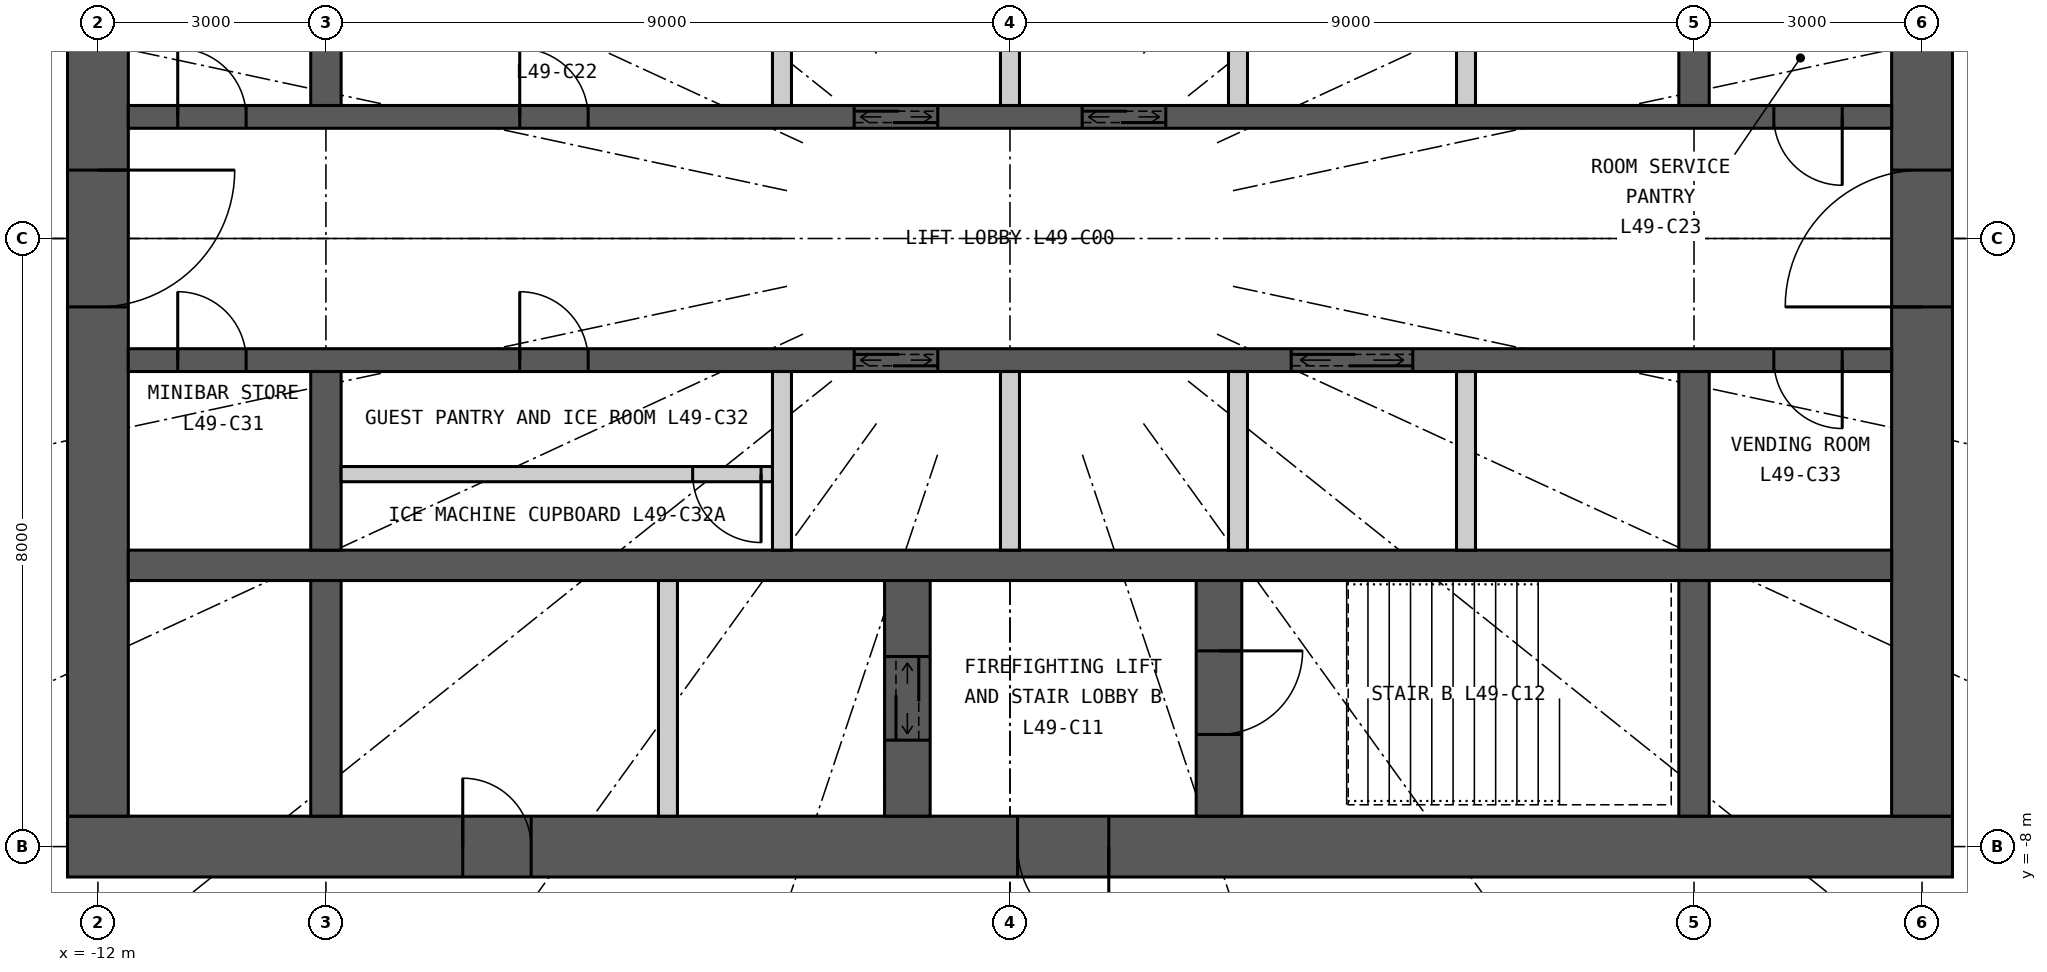
"""IFC4 building model, lengths in metres.
Left out: names, types, materials, properties, quantities, classifications, styles, units other than length and angle.
Written with IfcOpenShell. Run it as: python <this file> out.ifc"""

import sys

from ifc_helpers import new_model, si_unit, direction, frame, frame_2d, origin, place, context, subcontext, project, spatial, rectangle, extrude, element, fill, save


model = new_model("IFC4")
c1 = context("Model", 3, precision=1e-05, world=origin(), true_north=direction((0.0, 1.0)))
c2 = subcontext(c1, "Body", "Model", "MODEL_VIEW")
j1 = project(units=[si_unit("LENGTHUNIT", "METRE"), si_unit("PLANEANGLEUNIT", "RADIAN")], contexts=[c1])
p1 = place(None, origin())
s1 = spatial("IfcSite", under=j1, at=p1, CompositionType="ELEMENT")
p2 = place(p1, origin())
s2 = spatial("IfcBuilding", under=s1, at=p2, CompositionType="ELEMENT")
p3 = place(p2, frame((0.0, 0.0, 183.0)))
s3 = spatial("IfcBuildingStorey", under=s2, at=p3, CompositionType="ELEMENT", Elevation=183.0)
p4 = place(p3, frame((12.4, -8.0, 0.0), z_axis=(0.0, 0.0, 1.0), x_axis=(-1.0, 0.0, 0.0)))
e1 = element("IfcWall", 1, at=p4, inside=s3, PredefinedType="SHEAR", context=c2, shape_type="SweptSolid", body=[
    extrude(rectangle(XDim=24.8, YDim=0.8, at=frame_2d((12.4, 0.0))), origin(), (0.0, 0.0, 1.0), 3.3),
])
p5 = place(p4, frame((11.1, 0.0, 0.0)))
e2 = element("IfcOpeningElement", 2, at=p5, cuts=e1, PredefinedType="OPENING", context=c2, shape_type="SweptSolid", body=[
    extrude(rectangle(XDim=1.2, YDim=2.2, at=frame_2d((0.6, 1.1))), frame((0.0, 0.41, 0.0), z_axis=(0.0, -1.0, 0.0), x_axis=(1.0, 0.0, 0.0)), (0.0, 0.0, 1.0), 0.82),
])
p6 = place(p4, frame((18.7, 0.0, 0.0)))
e3 = element("IfcOpeningElement", 3, at=p6, cuts=e1, PredefinedType="OPENING", context=c2, shape_type="SweptSolid", body=[
    extrude(rectangle(XDim=0.9, YDim=2.2, at=frame_2d((0.45, 1.1))), frame((0.0, 0.41, 0.0), z_axis=(0.0, -1.0, 0.0), x_axis=(1.0, 0.0, 0.0)), (0.0, 0.0, 1.0), 0.82),
])
p7 = place(p3, frame((12.0, -7.6, 0.0), z_axis=(0.0, 0.0, 1.0), x_axis=(0.0, 1.0, 0.0)))
e4 = element("IfcWall", 4, at=p7, inside=s3, PredefinedType="SHEAR", context=c2, shape_type="SweptSolid", body=[
    extrude(rectangle(XDim=15.2, YDim=0.8, at=frame_2d((7.6, 0.0))), origin(), (0.0, 0.0, 1.0), 3.3),
])
p8 = place(p7, frame((6.7, 0.0, 0.0)))
e5 = element("IfcOpeningElement", 5, at=p8, cuts=e4, PredefinedType="OPENING", context=c2, shape_type="SweptSolid", body=[
    extrude(rectangle(XDim=1.8, YDim=2.2, at=frame_2d((0.9, 1.1))), frame((0.0, 0.41, 0.0), z_axis=(0.0, -1.0, 0.0), x_axis=(1.0, 0.0, 0.0)), (0.0, 0.0, 1.0), 0.82),
])
p9 = place(p3, frame((-12.0, 7.6, 0.0), z_axis=(0.0, 0.0, 1.0), x_axis=(0.0, -1.0, 0.0)))
e6 = element("IfcWall", 6, at=p9, inside=s3, PredefinedType="SHEAR", context=c2, shape_type="SweptSolid", body=[
    extrude(rectangle(XDim=15.2, YDim=0.8, at=frame_2d((7.6, 0.0))), origin(), (0.0, 0.0, 1.0), 3.3),
])
p10 = place(p9, frame((6.7, 0.0, 0.0)))
e7 = element("IfcOpeningElement", 7, at=p10, cuts=e6, PredefinedType="OPENING", context=c2, shape_type="SweptSolid", body=[
    extrude(rectangle(XDim=1.8, YDim=2.2, at=frame_2d((0.9, 1.1))), frame((0.0, 0.41, 0.0), z_axis=(0.0, -1.0, 0.0), x_axis=(1.0, 0.0, 0.0)), (0.0, 0.0, 1.0), 0.82),
])
p11 = place(p3, frame((-11.6, 1.6, 0.0), z_axis=(0.0, 0.0, 1.0), x_axis=(1.0, 0.0, 0.0)))
e8 = element("IfcWall", 8, at=p11, inside=s3, PredefinedType="SHEAR", context=c2, shape_type="SweptSolid", body=[
    extrude(rectangle(XDim=23.2, YDim=0.3, at=frame_2d((11.6, 0.0))), origin(), (0.0, 0.0, 1.0), 3.3),
])
p12 = place(p11, frame((9.55, 0.0, 0.0)))
e9 = element("IfcOpeningElement", 9, at=p12, cuts=e8, PredefinedType="OPENING", context=c2, shape_type="SweptSolid", body=[
    extrude(rectangle(XDim=1.1, YDim=2.2, at=frame_2d((0.55, 1.1))), frame((0.0, 0.16, 0.0), z_axis=(0.0, -1.0, 0.0), x_axis=(1.0, 0.0, 0.0)), (0.0, 0.0, 1.0), 0.32),
])
p13 = place(p11, frame((12.55, 0.0, 0.0)))
e10 = element("IfcOpeningElement", 10, at=p13, cuts=e8, PredefinedType="OPENING", context=c2, shape_type="SweptSolid", body=[
    extrude(rectangle(XDim=1.1, YDim=2.2, at=frame_2d((0.55, 1.1))), frame((0.0, 0.16, 0.0), z_axis=(0.0, -1.0, 0.0), x_axis=(1.0, 0.0, 0.0)), (0.0, 0.0, 1.0), 0.32),
])
p14 = place(p11, frame((0.65, 0.0, 0.0)))
e11 = element("IfcOpeningElement", 11, at=p14, cuts=e8, PredefinedType="OPENING", context=c2, shape_type="SweptSolid", body=[
    extrude(rectangle(XDim=0.9, YDim=2.2, at=frame_2d((0.45, 1.1))), frame((0.0, 0.16, 0.0), z_axis=(0.0, -1.0, 0.0), x_axis=(1.0, 0.0, 0.0)), (0.0, 0.0, 1.0), 0.32),
])
p15 = place(p11, frame((5.15, 0.0, 0.0)))
e12 = element("IfcOpeningElement", 12, at=p15, cuts=e8, PredefinedType="OPENING", context=c2, shape_type="SweptSolid", body=[
    extrude(rectangle(XDim=0.9, YDim=2.2, at=frame_2d((0.45, 1.1))), frame((0.0, 0.16, 0.0), z_axis=(0.0, -1.0, 0.0), x_axis=(1.0, 0.0, 0.0)), (0.0, 0.0, 1.0), 0.32),
])
p16 = place(p11, frame((21.65, 0.0, 0.0)))
e13 = element("IfcOpeningElement", 13, at=p16, cuts=e8, PredefinedType="OPENING", context=c2, shape_type="SweptSolid", body=[
    extrude(rectangle(XDim=0.9, YDim=2.2, at=frame_2d((0.45, 1.1))), frame((0.0, 0.16, 0.0), z_axis=(0.0, -1.0, 0.0), x_axis=(1.0, 0.0, 0.0)), (0.0, 0.0, 1.0), 0.32),
])
p17 = place(p3, frame((-11.6, -4.3, 0.0), z_axis=(0.0, 0.0, 1.0), x_axis=(1.0, 0.0, 0.0)))
e14 = element("IfcWall", 14, at=p17, inside=s3, PredefinedType="SHEAR", context=c2, shape_type="SweptSolid", body=[
    extrude(rectangle(XDim=23.2, YDim=0.4, at=frame_2d((11.6, 0.0))), origin(), (0.0, 0.0, 1.0), 3.3),
])
p18 = place(p3, frame((-11.6, -1.6, 0.0), z_axis=(0.0, 0.0, 1.0), x_axis=(1.0, 0.0, 0.0)))
e15 = element("IfcWall", 15, at=p18, inside=s3, PredefinedType="SHEAR", context=c2, shape_type="SweptSolid", body=[
    extrude(rectangle(XDim=23.2, YDim=0.3, at=frame_2d((11.6, 0.0))), origin(), (0.0, 0.0, 1.0), 3.3),
])
p19 = place(p18, frame((9.55, 0.0, 0.0)))
e16 = element("IfcOpeningElement", 16, at=p19, cuts=e15, PredefinedType="OPENING", context=c2, shape_type="SweptSolid", body=[
    extrude(rectangle(XDim=1.1, YDim=2.2, at=frame_2d((0.55, 1.1))), frame((0.0, 0.16, 0.0), z_axis=(0.0, -1.0, 0.0), x_axis=(1.0, 0.0, 0.0)), (0.0, 0.0, 1.0), 0.32),
])
p20 = place(p18, frame((15.3, 0.0, 0.0)))
e17 = element("IfcOpeningElement", 17, at=p20, cuts=e15, PredefinedType="OPENING", context=c2, shape_type="SweptSolid", body=[
    extrude(rectangle(XDim=1.6, YDim=2.4, at=frame_2d((0.8, 1.2))), frame((0.0, 0.16, 0.0), z_axis=(0.0, -1.0, 0.0), x_axis=(1.0, 0.0, 0.0)), (0.0, 0.0, 1.0), 0.32),
])
p21 = place(p18, frame((0.65, 0.0, 0.0)))
e18 = element("IfcOpeningElement", 18, at=p21, cuts=e15, PredefinedType="OPENING", context=c2, shape_type="SweptSolid", body=[
    extrude(rectangle(XDim=0.9, YDim=2.2, at=frame_2d((0.45, 1.1))), frame((0.0, 0.16, 0.0), z_axis=(0.0, -1.0, 0.0), x_axis=(1.0, 0.0, 0.0)), (0.0, 0.0, 1.0), 0.32),
])
p22 = place(p18, frame((5.15, 0.0, 0.0)))
e19 = element("IfcOpeningElement", 19, at=p22, cuts=e15, PredefinedType="OPENING", context=c2, shape_type="SweptSolid", body=[
    extrude(rectangle(XDim=0.9, YDim=2.2, at=frame_2d((0.45, 1.1))), frame((0.0, 0.16, 0.0), z_axis=(0.0, -1.0, 0.0), x_axis=(1.0, 0.0, 0.0)), (0.0, 0.0, 1.0), 0.32),
])
p23 = place(p18, frame((21.65, 0.0, 0.0)))
e20 = element("IfcOpeningElement", 20, at=p23, cuts=e15, PredefinedType="OPENING", context=c2, shape_type="SweptSolid", body=[
    extrude(rectangle(XDim=0.9, YDim=2.2, at=frame_2d((0.45, 1.1))), frame((0.0, 0.16, 0.0), z_axis=(0.0, -1.0, 0.0), x_axis=(1.0, 0.0, 0.0)), (0.0, 0.0, 1.0), 0.32),
])
for number, where, z_axis, x_axis in (
    (21, (-9.0, 1.75, 0.0), (0.0, 0.0, 1.0), (0.0, 1.0, 0.0)),
    (22, (-9.0, -4.1, 0.0), (0.0, 0.0, 1.0), (0.0, 1.0, 0.0)),
):
    element("IfcWall", number, at=place(p3, frame(where, z_axis=z_axis, x_axis=x_axis)), inside=s3, PredefinedType="SHEAR", context=c2, shape_type="SweptSolid", body=[
        extrude(rectangle(XDim=2.35, YDim=0.4, at=frame_2d((1.175, 0.0))), origin(), (0.0, 0.0, 1.0), 3.3),
    ])
p24 = place(p3, frame((-9.0, -7.6, 0.0), z_axis=(0.0, 0.0, 1.0), x_axis=(0.0, 1.0, 0.0)))
e23 = element("IfcWall", 23, at=p24, inside=s3, PredefinedType="SHEAR", context=c2, shape_type="SweptSolid", body=[
    extrude(rectangle(XDim=3.1, YDim=0.4, at=frame_2d((1.55, 0.0))), origin(), (0.0, 0.0, 1.0), 3.3),
])
for number, where, z_axis, x_axis in (
    (24, (9.0, 1.75, 0.0), (0.0, 0.0, 1.0), (0.0, 1.0, 0.0)),
    (25, (9.0, -4.1, 0.0), (0.0, 0.0, 1.0), (0.0, 1.0, 0.0)),
):
    element("IfcWall", number, at=place(p3, frame(where, z_axis=z_axis, x_axis=x_axis)), inside=s3, PredefinedType="SHEAR", context=c2, shape_type="SweptSolid", body=[
        extrude(rectangle(XDim=2.35, YDim=0.4, at=frame_2d((1.175, 0.0))), origin(), (0.0, 0.0, 1.0), 3.3),
    ])
p25 = place(p3, frame((9.0, -7.6, 0.0), z_axis=(0.0, 0.0, 1.0), x_axis=(0.0, 1.0, 0.0)))
e26 = element("IfcWall", 26, at=p25, inside=s3, PredefinedType="SHEAR", context=c2, shape_type="SweptSolid", body=[
    extrude(rectangle(XDim=3.1, YDim=0.4, at=frame_2d((1.55, 0.0))), origin(), (0.0, 0.0, 1.0), 3.3),
])
p26 = place(p3, frame((2.75, -7.6, 0.0), z_axis=(0.0, 0.0, 1.0), x_axis=(0.0, 1.0, 0.0)))
e27 = element("IfcWall", 27, at=p26, inside=s3, PredefinedType="SHEAR", context=c2, shape_type="SweptSolid", body=[
    extrude(rectangle(XDim=3.1, YDim=0.6, at=frame_2d((1.55, 0.0))), origin(), (0.0, 0.0, 1.0), 3.3),
])
p27 = place(p26, frame((1.075, 0.0, 0.0)))
e28 = element("IfcOpeningElement", 28, at=p27, cuts=e27, PredefinedType="OPENING", context=c2, shape_type="SweptSolid", body=[
    extrude(rectangle(XDim=1.1, YDim=2.2, at=frame_2d((0.55, 1.1))), frame((0.0, 0.31, 0.0), z_axis=(0.0, -1.0, 0.0), x_axis=(1.0, 0.0, 0.0)), (0.0, 0.0, 1.0), 0.62),
])
p28 = place(p3, frame((-1.35, -7.6, 0.0), z_axis=(0.0, 0.0, 1.0), x_axis=(0.0, 1.0, 0.0)))
e29 = element("IfcWall", 29, at=p28, inside=s3, PredefinedType="SHEAR", context=c2, shape_type="SweptSolid", body=[
    extrude(rectangle(XDim=3.1, YDim=0.6, at=frame_2d((1.55, 0.0))), origin(), (0.0, 0.0, 1.0), 3.3),
])
p29 = place(p28, frame((1.0, 0.0, 0.0)))
e30 = element("IfcOpeningElement", 30, at=p29, cuts=e29, PredefinedType="OPENING", context=c2, shape_type="SweptSolid", body=[
    extrude(rectangle(XDim=1.1, YDim=2.2, at=frame_2d((0.55, 1.1))), frame((0.0, 0.31, 0.0), z_axis=(0.0, -1.0, 0.0), x_axis=(1.0, 0.0, 0.0)), (0.0, 0.0, 1.0), 0.62),
])
p30 = place(p3, frame((-4.5, -7.6, 0.0), z_axis=(0.0, 0.0, 1.0), x_axis=(0.0, 1.0, 0.0)))
e31 = element("IfcWall", 31, at=p30, inside=s3, PredefinedType="PARTITIONING", context=c2, shape_type="SweptSolid", body=[
    extrude(rectangle(XDim=3.1, YDim=0.25, at=frame_2d((1.55, 0.0))), origin(), (0.0, 0.0, 1.0), 3.3),
])
for number, where, z_axis, x_axis in (
    (32, (-3.0, 1.75, 0.0), (0.0, 0.0, 1.0), (0.0, 1.0, 0.0)),
    (33, (0.0, 1.75, 0.0), (0.0, 0.0, 1.0), (0.0, 1.0, 0.0)),
    (34, (3.0, 1.75, 0.0), (0.0, 0.0, 1.0), (0.0, 1.0, 0.0)),
    (35, (6.0, 1.75, 0.0), (0.0, 0.0, 1.0), (0.0, 1.0, 0.0)),
    (36, (-3.0, -4.1, 0.0), (0.0, 0.0, 1.0), (0.0, 1.0, 0.0)),
    (37, (0.0, -4.1, 0.0), (0.0, 0.0, 1.0), (0.0, 1.0, 0.0)),
    (38, (3.0, -4.1, 0.0), (0.0, 0.0, 1.0), (0.0, 1.0, 0.0)),
    (39, (6.0, -4.1, 0.0), (0.0, 0.0, 1.0), (0.0, 1.0, 0.0)),
):
    element("IfcWall", number, at=place(p3, frame(where, z_axis=z_axis, x_axis=x_axis)), inside=s3, PredefinedType="PARTITIONING", context=c2, shape_type="SweptSolid", body=[
        extrude(rectangle(XDim=2.35, YDim=0.25, at=frame_2d((1.175, 0.0))), origin(), (0.0, 0.0, 1.0), 3.3),
    ])
p31 = place(p3, frame((-8.8, -3.1, 0.0), z_axis=(0.0, 0.0, 1.0), x_axis=(1.0, 0.0, 0.0)))
e40 = element("IfcWall", 40, at=p31, inside=s3, PredefinedType="PARTITIONING", context=c2, shape_type="SweptSolid", body=[
    extrude(rectangle(XDim=5.675, YDim=0.2, at=frame_2d((2.837, 0.0))), origin(), (0.0, 0.0, 1.0), 3.05),
])
p32 = place(p31, frame((4.625, 0.0, 0.0)))
e41 = element("IfcOpeningElement", 41, at=p32, cuts=e40, PredefinedType="OPENING", context=c2, shape_type="SweptSolid", body=[
    extrude(rectangle(XDim=0.9, YDim=2.2, at=frame_2d((0.45, 1.1))), frame((0.0, 0.11, 0.0), z_axis=(0.0, -1.0, 0.0), x_axis=(1.0, 0.0, 0.0)), (0.0, 0.0, 1.0), 0.22),
])
p33 = place(p5, origin())
e42 = element("IfcDoor", 42, at=p33, inside=s3, OperationType="SINGLE_SWING_LEFT", PredefinedType="DOOR", context=c2, shape_type="SweptSolid", body=[
    extrude(rectangle(XDim=1.2, YDim=2.2, at=frame_2d((0.6, 1.1))), frame((0.0, 0.025, 0.0), z_axis=(0.0, -1.0, 0.0), x_axis=(1.0, 0.0, 0.0)), (0.0, 0.0, 1.0), 0.05),
])
fill(e2, e42)
p34 = place(p27, origin())
e43 = element("IfcDoor", 43, at=p34, inside=s3, OperationType="SINGLE_SWING_RIGHT", PredefinedType="DOOR", context=c2, shape_type="SweptSolid", body=[
    extrude(rectangle(XDim=1.1, YDim=2.2, at=frame_2d((0.55, 1.1))), frame((0.0, 0.025, 0.0), z_axis=(0.0, -1.0, 0.0), x_axis=(1.0, 0.0, 0.0)), (0.0, 0.0, 1.0), 0.05),
])
fill(e28, e43)
p35 = place(p29, origin())
e44 = element("IfcDoor", 44, at=p35, inside=s3, OperationType="DOUBLE_DOOR_SLIDING", PredefinedType="DOOR", context=c2, shape_type="SweptSolid", body=[
    extrude(rectangle(XDim=1.1, YDim=2.2, at=frame_2d((0.55, 1.1))), frame((0.0, 0.025, 0.0), z_axis=(0.0, -1.0, 0.0), x_axis=(1.0, 0.0, 0.0)), (0.0, 0.0, 1.0), 0.05),
])
fill(e30, e44)
p36 = place(p6, origin())
e45 = element("IfcDoor", 45, at=p36, inside=s3, OperationType="SINGLE_SWING_RIGHT", PredefinedType="DOOR", context=c2, shape_type="SweptSolid", body=[
    extrude(rectangle(XDim=0.9, YDim=2.2, at=frame_2d((0.45, 1.1))), frame((0.0, 0.025, 0.0), z_axis=(0.0, -1.0, 0.0), x_axis=(1.0, 0.0, 0.0)), (0.0, 0.0, 1.0), 0.05),
])
fill(e3, e45)
p37 = place(p12, origin())
e46 = element("IfcDoor", 46, at=p37, inside=s3, OperationType="DOUBLE_DOOR_SLIDING", PredefinedType="DOOR", context=c2, shape_type="SweptSolid", body=[
    extrude(rectangle(XDim=1.1, YDim=2.2, at=frame_2d((0.55, 1.1))), frame((0.0, 0.025, 0.0), z_axis=(0.0, -1.0, 0.0), x_axis=(1.0, 0.0, 0.0)), (0.0, 0.0, 1.0), 0.05),
])
fill(e9, e46)
p38 = place(p13, origin())
e47 = element("IfcDoor", 47, at=p38, inside=s3, OperationType="DOUBLE_DOOR_SLIDING", PredefinedType="DOOR", context=c2, shape_type="SweptSolid", body=[
    extrude(rectangle(XDim=1.1, YDim=2.2, at=frame_2d((0.55, 1.1))), frame((0.0, 0.025, 0.0), z_axis=(0.0, -1.0, 0.0), x_axis=(1.0, 0.0, 0.0)), (0.0, 0.0, 1.0), 0.05),
])
fill(e10, e47)
p39 = place(p19, origin())
e48 = element("IfcDoor", 48, at=p39, inside=s3, OperationType="DOUBLE_DOOR_SLIDING", PredefinedType="DOOR", context=c2, shape_type="SweptSolid", body=[
    extrude(rectangle(XDim=1.1, YDim=2.2, at=frame_2d((0.55, 1.1))), frame((0.0, 0.025, 0.0), z_axis=(0.0, -1.0, 0.0), x_axis=(1.0, 0.0, 0.0)), (0.0, 0.0, 1.0), 0.05),
])
fill(e16, e48)
p40 = place(p20, origin())
e49 = element("IfcDoor", 49, at=p40, inside=s3, OperationType="DOUBLE_DOOR_SLIDING", PredefinedType="DOOR", context=c2, shape_type="SweptSolid", body=[
    extrude(rectangle(XDim=1.6, YDim=2.4, at=frame_2d((0.8, 1.2))), frame((0.0, 0.025, 0.0), z_axis=(0.0, -1.0, 0.0), x_axis=(1.0, 0.0, 0.0)), (0.0, 0.0, 1.0), 0.05),
])
fill(e17, e49)
p41 = place(p14, origin())
e50 = element("IfcDoor", 50, at=p41, inside=s3, OperationType="SINGLE_SWING_LEFT", PredefinedType="DOOR", context=c2, shape_type="SweptSolid", body=[
    extrude(rectangle(XDim=0.9, YDim=2.2, at=frame_2d((0.45, 1.1))), frame((0.0, 0.025, 0.0), z_axis=(0.0, -1.0, 0.0), x_axis=(1.0, 0.0, 0.0)), (0.0, 0.0, 1.0), 0.05),
])
fill(e11, e50)
p42 = place(p15, origin())
e51 = element("IfcDoor", 51, at=p42, inside=s3, OperationType="SINGLE_SWING_LEFT", PredefinedType="DOOR", context=c2, shape_type="SweptSolid", body=[
    extrude(rectangle(XDim=0.9, YDim=2.2, at=frame_2d((0.45, 1.1))), frame((0.0, 0.025, 0.0), z_axis=(0.0, -1.0, 0.0), x_axis=(1.0, 0.0, 0.0)), (0.0, 0.0, 1.0), 0.05),
])
fill(e12, e51)
p43 = place(p21, origin())
e52 = element("IfcDoor", 52, at=p43, inside=s3, OperationType="SINGLE_SWING_LEFT", PredefinedType="DOOR", context=c2, shape_type="SweptSolid", body=[
    extrude(rectangle(XDim=0.9, YDim=2.2, at=frame_2d((0.45, 1.1))), frame((0.0, 0.025, 0.0), z_axis=(0.0, -1.0, 0.0), x_axis=(1.0, 0.0, 0.0)), (0.0, 0.0, 1.0), 0.05),
])
fill(e18, e52)
p44 = place(p32, origin())
e53 = element("IfcDoor", 53, at=p44, inside=s3, OperationType="SINGLE_SWING_RIGHT", PredefinedType="DOOR", context=c2, shape_type="SweptSolid", body=[
    extrude(rectangle(XDim=0.9, YDim=2.2, at=frame_2d((0.45, 1.1))), frame((0.0, 0.025, 0.0), z_axis=(0.0, -1.0, 0.0), x_axis=(1.0, 0.0, 0.0)), (0.0, 0.0, 1.0), 0.05),
])
fill(e41, e53)
p45 = place(p22, origin())
e54 = element("IfcDoor", 54, at=p45, inside=s3, OperationType="SINGLE_SWING_LEFT", PredefinedType="DOOR", context=c2, shape_type="SweptSolid", body=[
    extrude(rectangle(XDim=0.9, YDim=2.2, at=frame_2d((0.45, 1.1))), frame((0.0, 0.025, 0.0), z_axis=(0.0, -1.0, 0.0), x_axis=(1.0, 0.0, 0.0)), (0.0, 0.0, 1.0), 0.05),
])
fill(e19, e54)
p46 = place(p23, origin())
e55 = element("IfcDoor", 55, at=p46, inside=s3, OperationType="SINGLE_SWING_RIGHT", PredefinedType="DOOR", context=c2, shape_type="SweptSolid", body=[
    extrude(rectangle(XDim=0.9, YDim=2.2, at=frame_2d((0.45, 1.1))), frame((0.0, 0.025, 0.0), z_axis=(0.0, -1.0, 0.0), x_axis=(1.0, 0.0, 0.0)), (0.0, 0.0, 1.0), 0.05),
])
fill(e20, e55)
p47 = place(p16, origin())
e56 = element("IfcDoor", 56, at=p47, inside=s3, OperationType="SINGLE_SWING_RIGHT", PredefinedType="DOOR", context=c2, shape_type="SweptSolid", body=[
    extrude(rectangle(XDim=0.9, YDim=2.2, at=frame_2d((0.45, 1.1))), frame((0.0, 0.025, 0.0), z_axis=(0.0, -1.0, 0.0), x_axis=(1.0, 0.0, 0.0)), (0.0, 0.0, 1.0), 0.05),
])
fill(e13, e56)
p48 = place(p8, origin())
e57 = element("IfcDoor", 57, at=p48, inside=s3, OperationType="DOUBLE_DOOR_DOUBLE_SWING", PredefinedType="DOOR", context=c2, shape_type="SweptSolid", body=[
    extrude(rectangle(XDim=1.8, YDim=2.2, at=frame_2d((0.9, 1.1))), frame((0.0, 0.025, 0.0), z_axis=(0.0, -1.0, 0.0), x_axis=(1.0, 0.0, 0.0)), (0.0, 0.0, 1.0), 0.05),
])
fill(e5, e57)
p49 = place(p10, origin())
e58 = element("IfcDoor", 58, at=p49, inside=s3, OperationType="DOUBLE_DOOR_DOUBLE_SWING", PredefinedType="DOOR", context=c2, shape_type="SweptSolid", body=[
    extrude(rectangle(XDim=1.8, YDim=2.2, at=frame_2d((0.9, 1.1))), frame((0.0, 0.025, 0.0), z_axis=(0.0, -1.0, 0.0), x_axis=(1.0, 0.0, 0.0)), (0.0, 0.0, 1.0), 0.05),
])
fill(e7, e58)
save(model, sys.argv[1])
